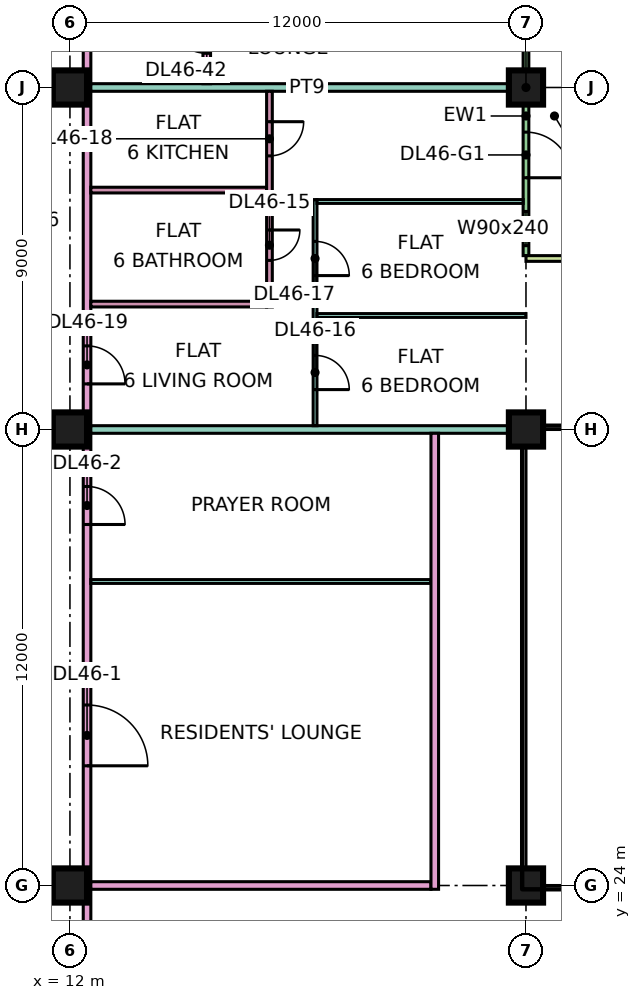
"""IFC4 building model, lengths in metres.
Left out: names, types, materials, properties, quantities, classifications, styles, units other than length and angle.
Written with IfcOpenShell. Run it as: python <this file> out.ifc"""

import sys

from ifc_helpers import new_model, si_unit, direction, frame, frame_2d, origin, origin_2d, place, context, subcontext, project, spatial, rectangle, extrude, element, fill, save


model = new_model("IFC4")
c1 = context("Model", 3, precision=1e-05, world=origin(), true_north=direction((0.0, 1.0)))
c2 = subcontext(c1, "Body", "Model", "MODEL_VIEW")
j1 = project(units=[si_unit("LENGTHUNIT", "METRE"), si_unit("PLANEANGLEUNIT", "RADIAN")], contexts=[c1])
p1 = place(None, origin())
s1 = spatial("IfcSite", under=j1, at=p1, CompositionType="ELEMENT")
p2 = place(p1, origin())
s2 = spatial("IfcBuilding", under=s1, at=p2, CompositionType="ELEMENT")
p3 = place(p2, frame((0.0, 0.0, 198.65)))
s3 = spatial("IfcBuildingStorey", under=s2, at=p3, CompositionType="ELEMENT", Elevation=198.65)
for number, where, z_axis, x_axis in (
    (1, (12.0, 24.0, 0.0), (0.0, 0.0, 1.0), (1.0, 0.0, 0.0)),
    (2, (12.0, 36.0, 0.0), (0.0, 0.0, 1.0), (1.0, 0.0, 0.0)),
    (3, (12.0, 45.0, 0.0), (0.0, 0.0, 1.0), (1.0, 0.0, 0.0)),
    (4, (24.0, 24.0, 0.0), (0.0, 0.0, 1.0), (1.0, 0.0, 0.0)),
    (5, (24.0, 36.0, 0.0), (0.0, 0.0, 1.0), (1.0, 0.0, 0.0)),
    (6, (24.0, 45.0, 0.0), (0.0, 0.0, 1.0), (1.0, 0.0, 0.0)),
):
    element("IfcColumn", number, at=place(p3, frame(where, z_axis=z_axis, x_axis=x_axis)), inside=s3, PredefinedType="COLUMN", context=c2, shape_type="SweptSolid", body=[
        extrude(rectangle(XDim=0.9, YDim=0.9, at=origin_2d()), origin(), (0.0, 0.0, 1.0), 3.75),
    ])
p4 = place(p3, frame((24.0, 40.575, 0.0), z_axis=(0.0, 0.0, 1.0), x_axis=(0.0, 1.0, 0.0)))
e7 = element("IfcWall", 7, at=p4, inside=s3, PredefinedType="SOLIDWALL", context=c2, shape_type="SweptSolid", body=[
    extrude(rectangle(XDim=7.35, YDim=0.15, at=frame_2d((3.675, 0.0))), origin(), (0.0, 0.0, 1.0), 3.35),
])
p5 = place(p4, frame((0.262, 0.0, 0.45)))
e8 = element("IfcOpeningElement", 8, at=p5, cuts=e7, PredefinedType="OPENING", context=c2, shape_type="SweptSolid", body=[
    extrude(rectangle(XDim=0.9, YDim=2.4, at=frame_2d((0.45, 1.2))), frame((0.0, 0.085, 0.0), z_axis=(0.0, -1.0, 0.0), x_axis=(1.0, 0.0, 0.0)), (0.0, 0.0, 1.0), 0.17),
])
p6 = place(p4, frame((2.05, 0.0, 0.0)))
e9 = element("IfcOpeningElement", 9, at=p6, cuts=e7, PredefinedType="OPENING", context=c2, shape_type="SweptSolid", body=[
    extrude(rectangle(XDim=1.2, YDim=2.4, at=frame_2d((0.6, 1.2))), frame((0.0, 0.085, 0.0), z_axis=(0.0, -1.0, 0.0), x_axis=(1.0, 0.0, 0.0)), (0.0, 0.0, 1.0), 0.17),
])
p7 = place(p4, frame((5.562, 0.0, 0.45)))
e10 = element("IfcOpeningElement", 10, at=p7, cuts=e7, PredefinedType="OPENING", context=c2, shape_type="SweptSolid", body=[
    extrude(rectangle(XDim=1.2, YDim=2.4, at=frame_2d((0.6, 1.2))), frame((0.0, 0.085, 0.0), z_axis=(0.0, -1.0, 0.0), x_axis=(1.0, 0.0, 0.0)), (0.0, 0.0, 1.0), 0.17),
])
p8 = place(p3, frame((25.5, 40.5, 0.0), z_axis=(0.0, 0.0, 1.0), x_axis=(-1.0, 0.0, 0.0)))
e11 = element("IfcWall", 11, at=p8, inside=s3, PredefinedType="SOLIDWALL", context=c2, shape_type="SweptSolid", body=[
    extrude(rectangle(XDim=1.5, YDim=0.15, at=frame_2d((0.75, 0.0))), origin(), (0.0, 0.0, 1.0), 3.35),
])
p9 = place(p3, frame((12.45, 20.0, 0.0), z_axis=(0.0, 0.0, 1.0), x_axis=(0.0, 1.0, 0.0)))
e12 = element("IfcWall", 12, at=p9, inside=s3, PredefinedType="PARTITIONING", context=c2, shape_type="SweptSolid", body=[
    extrude(rectangle(XDim=42.926, YDim=0.2, at=frame_2d((21.463, 0.0))), origin(), (0.0, 0.0, 1.0), 3.35),
])
p10 = place(p9, frame((7.15, 0.0, 0.0)))
e13 = element("IfcOpeningElement", 13, at=p10, cuts=e12, PredefinedType="OPENING", context=c2, shape_type="SweptSolid", body=[
    extrude(rectangle(XDim=1.6, YDim=2.1, at=frame_2d((0.8, 1.05))), frame((0.0, 0.11, 0.0), z_axis=(0.0, -1.0, 0.0), x_axis=(1.0, 0.0, 0.0)), (0.0, 0.0, 1.0), 0.22),
])
p11 = place(p9, frame((13.5, 0.0, 0.0)))
e14 = element("IfcOpeningElement", 14, at=p11, cuts=e12, PredefinedType="OPENING", context=c2, shape_type="SweptSolid", body=[
    extrude(rectangle(XDim=1.0, YDim=2.1, at=frame_2d((0.5, 1.05))), frame((0.0, 0.11, 0.0), z_axis=(0.0, -1.0, 0.0), x_axis=(1.0, 0.0, 0.0)), (0.0, 0.0, 1.0), 0.22),
])
p12 = place(p9, frame((17.2, 0.0, 0.0)))
e15 = element("IfcOpeningElement", 15, at=p12, cuts=e12, PredefinedType="OPENING", context=c2, shape_type="SweptSolid", body=[
    extrude(rectangle(XDim=1.0, YDim=2.1, at=frame_2d((0.5, 1.05))), frame((0.0, 0.11, 0.0), z_axis=(0.0, -1.0, 0.0), x_axis=(1.0, 0.0, 0.0)), (0.0, 0.0, 1.0), 0.22),
])
p13 = place(p9, frame((35.2, 0.0, 0.0)))
e16 = element("IfcOpeningElement", 16, at=p13, cuts=e12, PredefinedType="OPENING", context=c2, shape_type="SweptSolid", body=[
    extrude(rectangle(XDim=1.0, YDim=2.1, at=frame_2d((0.5, 1.05))), frame((0.0, 0.11, 0.0), z_axis=(0.0, -1.0, 0.0), x_axis=(1.0, 0.0, 0.0)), (0.0, 0.0, 1.0), 0.22),
])
p14 = place(p9, frame((1.15, 0.0, 0.0)))
e17 = element("IfcOpeningElement", 17, at=p14, cuts=e12, PredefinedType="OPENING", context=c2, shape_type="SweptSolid", body=[
    extrude(rectangle(XDim=1.8, YDim=2.1, at=frame_2d((0.9, 1.05))), frame((0.0, 0.11, 0.0), z_axis=(0.0, -1.0, 0.0), x_axis=(1.0, 0.0, 0.0)), (0.0, 0.0, 1.0), 0.22),
])
p15 = place(p9, frame((28.6, 0.0, 0.0)))
e18 = element("IfcOpeningElement", 18, at=p15, cuts=e12, PredefinedType="OPENING", context=c2, shape_type="SweptSolid", body=[
    extrude(rectangle(XDim=1.8, YDim=2.1, at=frame_2d((0.9, 1.05))), frame((0.0, 0.11, 0.0), z_axis=(0.0, -1.0, 0.0), x_axis=(1.0, 0.0, 0.0)), (0.0, 0.0, 1.0), 0.22),
])
p16 = place(p3, frame((12.55, 24.0, 0.0), z_axis=(0.0, 0.0, 1.0), x_axis=(1.0, 0.0, 0.0)))
e19 = element("IfcWall", 19, at=p16, inside=s3, PredefinedType="PARTITIONING", context=c2, shape_type="SweptSolid", body=[
    extrude(rectangle(XDim=8.95, YDim=0.2, at=frame_2d((4.475, 0.0))), origin(), (0.0, 0.0, 1.0), 3.35),
])
p17 = place(p3, frame((12.55, 32.0, 0.0), z_axis=(0.0, 0.0, 1.0), x_axis=(1.0, 0.0, 0.0)))
e20 = element("IfcWall", 20, at=p17, inside=s3, PredefinedType="PARTITIONING", context=c2, shape_type="SweptSolid", body=[
    extrude(rectangle(XDim=8.95, YDim=0.1, at=frame_2d((4.475, 0.0))), origin(), (0.0, 0.0, 1.0), 3.35),
])
p18 = place(p3, frame((12.55, 36.0, 0.0), z_axis=(0.0, 0.0, 1.0), x_axis=(1.0, 0.0, 0.0)))
e21 = element("IfcWall", 21, at=p18, inside=s3, PredefinedType="PARTITIONING", context=c2, shape_type="SweptSolid", body=[
    extrude(rectangle(XDim=11.45, YDim=0.2, at=frame_2d((5.725, 0.0))), origin(), (0.0, 0.0, 1.0), 3.35),
])
for number, where, z_axis, x_axis in (
    (22, (12.55, 39.3, 0.0), (0.0, 0.0, 1.0), (1.0, 0.0, 0.0)),
    (23, (12.55, 42.3, 0.0), (0.0, 0.0, 1.0), (1.0, 0.0, 0.0)),
):
    element("IfcWall", number, at=place(p3, frame(where, z_axis=z_axis, x_axis=x_axis)), inside=s3, PredefinedType="PARTITIONING", context=c2, shape_type="SweptSolid", body=[
        extrude(rectangle(XDim=4.625, YDim=0.15, at=frame_2d((2.312, 0.0))), origin(), (0.0, 0.0, 1.0), 3.35),
    ])
p19 = place(p3, frame((12.55, 45.0, 0.0), z_axis=(0.0, 0.0, 1.0), x_axis=(1.0, 0.0, 0.0)))
e24 = element("IfcWall", 24, at=p19, inside=s3, PredefinedType="PARTITIONING", context=c2, shape_type="SweptSolid", body=[
    extrude(rectangle(XDim=11.376, YDim=0.2, at=frame_2d((5.688, 0.0))), origin(), (0.0, 0.0, 1.0), 3.35),
])
p20 = place(p3, frame((15.6, 45.1, 0.0), z_axis=(0.0, 0.0, 1.0), x_axis=(0.0, 1.0, 0.0)))
e25 = element("IfcWall", 25, at=p20, inside=s3, PredefinedType="PARTITIONING", context=c2, shape_type="SweptSolid", body=[
    extrude(rectangle(XDim=2.675, YDim=0.2, at=frame_2d((1.337, 0.0))), origin(), (0.0, 0.0, 1.0), 3.35),
])
p21 = place(p20, frame((0.8, 0.0, 0.0)))
e26 = element("IfcOpeningElement", 26, at=p21, cuts=e25, PredefinedType="OPENING", context=c2, shape_type="SweptSolid", body=[
    extrude(rectangle(XDim=1.0, YDim=2.1, at=frame_2d((0.5, 1.05))), frame((0.0, 0.11, 0.0), z_axis=(0.0, -1.0, 0.0), x_axis=(1.0, 0.0, 0.0)), (0.0, 0.0, 1.0), 0.22),
])
p22 = place(p3, frame((17.25, 39.225, 0.0), z_axis=(0.0, 0.0, 1.0), x_axis=(0.0, 1.0, 0.0)))
e27 = element("IfcWall", 27, at=p22, inside=s3, PredefinedType="PARTITIONING", context=c2, shape_type="SweptSolid", body=[
    extrude(rectangle(XDim=5.675, YDim=0.15, at=frame_2d((2.837, 0.0))), origin(), (0.0, 0.0, 1.0), 3.35),
])
p23 = place(p22, frame((1.225, 0.0, 0.0)))
e28 = element("IfcOpeningElement", 28, at=p23, cuts=e27, PredefinedType="OPENING", context=c2, shape_type="SweptSolid", body=[
    extrude(rectangle(XDim=0.8, YDim=2.1, at=frame_2d((0.4, 1.05))), frame((0.0, 0.085, 0.0), z_axis=(0.0, -1.0, 0.0), x_axis=(1.0, 0.0, 0.0)), (0.0, 0.0, 1.0), 0.17),
])
p24 = place(p22, frame((3.975, 0.0, 0.0)))
e29 = element("IfcOpeningElement", 29, at=p24, cuts=e27, PredefinedType="OPENING", context=c2, shape_type="SweptSolid", body=[
    extrude(rectangle(XDim=0.9, YDim=2.1, at=frame_2d((0.45, 1.05))), frame((0.0, 0.085, 0.0), z_axis=(0.0, -1.0, 0.0), x_axis=(1.0, 0.0, 0.0)), (0.0, 0.0, 1.0), 0.17),
])
p25 = place(p3, frame((18.45, 36.1, 0.0), z_axis=(0.0, 0.0, 1.0), x_axis=(0.0, 1.0, 0.0)))
e30 = element("IfcWall", 30, at=p25, inside=s3, PredefinedType="PARTITIONING", context=c2, shape_type="SweptSolid", body=[
    extrude(rectangle(XDim=5.95, YDim=0.1, at=frame_2d((2.975, 0.0))), origin(), (0.0, 0.0, 1.0), 3.35),
])
p26 = place(p25, frame((0.95, 0.0, 0.0)))
e31 = element("IfcOpeningElement", 31, at=p26, cuts=e30, PredefinedType="OPENING", context=c2, shape_type="SweptSolid", body=[
    extrude(rectangle(XDim=0.9, YDim=2.1, at=frame_2d((0.45, 1.05))), frame((0.0, 0.06, 0.0), z_axis=(0.0, -1.0, 0.0), x_axis=(1.0, 0.0, 0.0)), (0.0, 0.0, 1.0), 0.12),
])
p27 = place(p25, frame((3.95, 0.0, 0.0)))
e32 = element("IfcOpeningElement", 32, at=p27, cuts=e30, PredefinedType="OPENING", context=c2, shape_type="SweptSolid", body=[
    extrude(rectangle(XDim=0.9, YDim=2.1, at=frame_2d((0.45, 1.05))), frame((0.0, 0.06, 0.0), z_axis=(0.0, -1.0, 0.0), x_axis=(1.0, 0.0, 0.0)), (0.0, 0.0, 1.0), 0.12),
])
p28 = place(p3, frame((18.5, 39.0, 0.0), z_axis=(0.0, 0.0, 1.0), x_axis=(1.0, 0.0, 0.0)))
e33 = element("IfcWall", 33, at=p28, inside=s3, PredefinedType="PARTITIONING", context=c2, shape_type="SweptSolid", body=[
    extrude(rectangle(XDim=5.5, YDim=0.1, at=frame_2d((2.75, 0.0))), origin(), (0.0, 0.0, 1.0), 3.35),
])
p29 = place(p3, frame((18.5, 42.0, 0.0), z_axis=(0.0, 0.0, 1.0), x_axis=(1.0, 0.0, 0.0)))
e34 = element("IfcWall", 34, at=p29, inside=s3, PredefinedType="PARTITIONING", context=c2, shape_type="SweptSolid", body=[
    extrude(rectangle(XDim=5.426, YDim=0.1, at=frame_2d((2.713, 0.0))), origin(), (0.0, 0.0, 1.0), 3.35),
])
p30 = place(p3, frame((21.6, 23.9, 0.0), z_axis=(0.0, 0.0, 1.0), x_axis=(0.0, 1.0, 0.0)))
e35 = element("IfcWall", 35, at=p30, inside=s3, PredefinedType="PARTITIONING", context=c2, shape_type="SweptSolid", body=[
    extrude(rectangle(XDim=12.0, YDim=0.2, at=frame_2d((6.0, 0.0))), origin(), (0.0, 0.0, 1.0), 3.35),
])
p31 = place(p5, origin())
e36 = element("IfcWindow", 36, at=p31, inside=s3, PartitioningType="SINGLE_PANEL", PredefinedType="WINDOW", context=c2, shape_type="SweptSolid", body=[
    extrude(rectangle(XDim=0.9, YDim=2.4, at=frame_2d((0.45, 1.2))), frame((0.0, 0.03, 0.0), z_axis=(0.0, -1.0, 0.0), x_axis=(1.0, 0.0, 0.0)), (0.0, 0.0, 1.0), 0.06),
])
fill(e8, e36)
p32 = place(p6, frame((1.2, 0.0, 0.0), z_axis=(0.0, 0.0, 1.0), x_axis=(-1.0, 0.0, 0.0)))
e37 = element("IfcDoor", 37, at=p32, inside=s3, OperationType="DOUBLE_DOOR_SINGLE_SWING", PredefinedType="DOOR", context=c2, shape_type="SweptSolid", body=[
    extrude(rectangle(XDim=1.2, YDim=2.4, at=frame_2d((0.6, 1.2))), frame((0.0, 0.025, 0.0), z_axis=(0.0, -1.0, 0.0), x_axis=(1.0, 0.0, 0.0)), (0.0, 0.0, 1.0), 0.05),
])
fill(e9, e37)
p33 = place(p10, frame((1.6, 0.0, 0.0), z_axis=(0.0, 0.0, 1.0), x_axis=(-1.0, 0.0, 0.0)))
e38 = element("IfcDoor", 38, at=p33, inside=s3, OperationType="DOUBLE_DOOR_SINGLE_SWING", PredefinedType="DOOR", context=c2, shape_type="SweptSolid", body=[
    extrude(rectangle(XDim=1.6, YDim=2.1, at=frame_2d((0.8, 1.05))), frame((0.0, 0.025, 0.0), z_axis=(0.0, -1.0, 0.0), x_axis=(1.0, 0.0, 0.0)), (0.0, 0.0, 1.0), 0.05),
])
fill(e13, e38)
p34 = place(p11, frame((1.0, 0.0, 0.0), z_axis=(0.0, 0.0, 1.0), x_axis=(-1.0, 0.0, 0.0)))
e39 = element("IfcDoor", 39, at=p34, inside=s3, OperationType="SINGLE_SWING_LEFT", PredefinedType="DOOR", context=c2, shape_type="SweptSolid", body=[
    extrude(rectangle(XDim=1.0, YDim=2.1, at=frame_2d((0.5, 1.05))), frame((0.0, 0.025, 0.0), z_axis=(0.0, -1.0, 0.0), x_axis=(1.0, 0.0, 0.0)), (0.0, 0.0, 1.0), 0.05),
])
fill(e14, e39)
p35 = place(p23, origin())
e40 = element("IfcDoor", 40, at=p35, inside=s3, OperationType="SINGLE_SWING_RIGHT", PredefinedType="DOOR", context=c2, shape_type="SweptSolid", body=[
    extrude(rectangle(XDim=0.8, YDim=2.1, at=frame_2d((0.4, 1.05))), frame((0.0, 0.025, 0.0), z_axis=(0.0, -1.0, 0.0), x_axis=(1.0, 0.0, 0.0)), (0.0, 0.0, 1.0), 0.05),
])
fill(e28, e40)
p36 = place(p26, frame((0.9, 0.0, 0.0), z_axis=(0.0, 0.0, 1.0), x_axis=(-1.0, 0.0, 0.0)))
e41 = element("IfcDoor", 41, at=p36, inside=s3, OperationType="SINGLE_SWING_LEFT", PredefinedType="DOOR", context=c2, shape_type="SweptSolid", body=[
    extrude(rectangle(XDim=0.9, YDim=2.1, at=frame_2d((0.45, 1.05))), frame((0.0, 0.025, 0.0), z_axis=(0.0, -1.0, 0.0), x_axis=(1.0, 0.0, 0.0)), (0.0, 0.0, 1.0), 0.05),
])
fill(e31, e41)
p37 = place(p27, frame((0.9, 0.0, 0.0), z_axis=(0.0, 0.0, 1.0), x_axis=(-1.0, 0.0, 0.0)))
e42 = element("IfcDoor", 42, at=p37, inside=s3, OperationType="SINGLE_SWING_LEFT", PredefinedType="DOOR", context=c2, shape_type="SweptSolid", body=[
    extrude(rectangle(XDim=0.9, YDim=2.1, at=frame_2d((0.45, 1.05))), frame((0.0, 0.025, 0.0), z_axis=(0.0, -1.0, 0.0), x_axis=(1.0, 0.0, 0.0)), (0.0, 0.0, 1.0), 0.05),
])
fill(e32, e42)
p38 = place(p24, origin())
e43 = element("IfcDoor", 43, at=p38, inside=s3, OperationType="SINGLE_SWING_RIGHT", PredefinedType="DOOR", context=c2, shape_type="SweptSolid", body=[
    extrude(rectangle(XDim=0.9, YDim=2.1, at=frame_2d((0.45, 1.05))), frame((0.0, 0.025, 0.0), z_axis=(0.0, -1.0, 0.0), x_axis=(1.0, 0.0, 0.0)), (0.0, 0.0, 1.0), 0.05),
])
fill(e29, e43)
p39 = place(p12, frame((1.0, 0.0, 0.0), z_axis=(0.0, 0.0, 1.0), x_axis=(-1.0, 0.0, 0.0)))
e44 = element("IfcDoor", 44, at=p39, inside=s3, OperationType="SINGLE_SWING_LEFT", PredefinedType="DOOR", context=c2, shape_type="SweptSolid", body=[
    extrude(rectangle(XDim=1.0, YDim=2.1, at=frame_2d((0.5, 1.05))), frame((0.0, 0.025, 0.0), z_axis=(0.0, -1.0, 0.0), x_axis=(1.0, 0.0, 0.0)), (0.0, 0.0, 1.0), 0.05),
])
fill(e15, e44)
p40 = place(p21, frame((1.0, 0.0, 0.0), z_axis=(0.0, 0.0, 1.0), x_axis=(-1.0, 0.0, 0.0)))
e45 = element("IfcDoor", 45, at=p40, inside=s3, OperationType="SINGLE_SWING_RIGHT", PredefinedType="DOOR", context=c2, shape_type="SweptSolid", body=[
    extrude(rectangle(XDim=1.0, YDim=2.1, at=frame_2d((0.5, 1.05))), frame((0.0, 0.025, 0.0), z_axis=(0.0, -1.0, 0.0), x_axis=(1.0, 0.0, 0.0)), (0.0, 0.0, 1.0), 0.05),
])
fill(e26, e45)
save(model, sys.argv[1])
